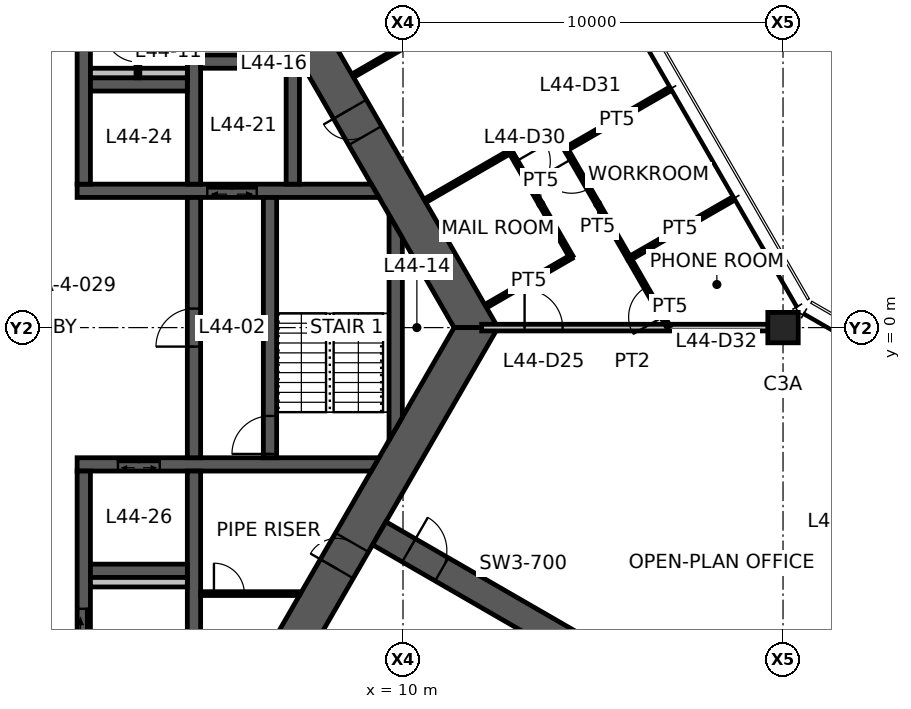
"""IFC4 building model, lengths in metres.
Left out: names, types, materials, properties, quantities, classifications, styles, units other than length and angle.
Written with IfcOpenShell. Run it as: python <this file> out.ifc"""

import sys

from ifc_helpers import new_model, si_unit, direction, frame, frame_2d, origin, origin_2d, place, context, subcontext, project, spatial, polyline, rectangle, hollow_rectangle, outline, extrude, element, fill, save


model = new_model("IFC4")
c1 = context("Model", 3, precision=1e-05, world=origin(), true_north=direction((0.0, 1.0)))
c2 = subcontext(c1, "Body", "Model", "MODEL_VIEW")
j1 = project(units=[si_unit("LENGTHUNIT", "METRE"), si_unit("PLANEANGLEUNIT", "RADIAN")], contexts=[c1])
p1 = place(None, origin())
s1 = spatial("IfcSite", under=j1, at=p1, CompositionType="ELEMENT")
p2 = place(p1, origin())
s2 = spatial("IfcBuilding", under=s1, at=p2, CompositionType="ELEMENT")
p3 = place(p2, frame((0.0, 0.0, 176.0)))
s3 = spatial("IfcBuildingStorey", under=s2, at=p3, CompositionType="ELEMENT", Elevation=176.0)
p4 = place(p3, frame((20.0, 0.0, 0.0), z_axis=(0.0, 0.0, 1.0), x_axis=(1.0, 0.0, 0.0)))
e1 = element("IfcColumn", 1, at=p4, inside=s3, PredefinedType="COLUMN", context=c2, shape_type="SweptSolid", body=[
    extrude(hollow_rectangle(XDim=0.8, YDim=0.8, WallThickness=0.045, at=origin_2d()), origin(), (0.0, 0.0, 1.0), 3.9),
])
p5 = place(p3, frame((11.922, 0.0, 0.0), z_axis=(0.0, 0.0, 1.0), x_axis=(-0.500004296715, 0.866022923061, 0.0)))
e2 = element("IfcWall", 2, at=p5, inside=s3, PredefinedType="SHEAR", context=c2, shape_type="SweptSolid", body=[
    extrude(outline(polyline([(-0.289, -0.5), (5.835, -0.5), (6.635, -0.5), (12.211, -0.5), (11.634, 0.5), (6.635, 0.5), (5.835, 0.5), (0.289, 0.5), (-0.289, -0.5)])), origin(), (0.0, 0.0, 1.0), 3.9),
])
p6 = place(p5, frame((5.835, 0.0, 0.0)))
e3 = element("IfcOpeningElement", 3, at=p6, cuts=e2, PredefinedType="OPENING", context=c2, shape_type="SweptSolid", body=[
    extrude(rectangle(XDim=0.8, YDim=2.1, at=frame_2d((0.4, 1.05))), frame((0.0, 0.51, 0.0), z_axis=(0.0, -1.0, 0.0), x_axis=(1.0, 0.0, 0.0)), (0.0, 0.0, 1.0), 1.02),
])
p7 = place(p3, frame((5.961, -10.325, 0.0), z_axis=(0.0, 0.0, 1.0), x_axis=(0.500004296715, 0.866022923061, 0.0)))
e4 = element("IfcWall", 4, at=p7, inside=s3, PredefinedType="SHEAR", context=c2, shape_type="SweptSolid", body=[
    extrude(outline(polyline([(-0.289, -0.5), (4.594, -0.5), (5.394, -0.5), (12.211, -0.5), (11.634, 0.5), (5.394, 0.5), (4.594, 0.5), (0.289, 0.5), (-0.289, -0.5)])), origin(), (0.0, 0.0, 1.0), 3.9),
])
p8 = place(p7, frame((4.594, 0.0, 0.0)))
e5 = element("IfcOpeningElement", 5, at=p8, cuts=e4, PredefinedType="OPENING", context=c2, shape_type="SweptSolid", body=[
    extrude(rectangle(XDim=0.8, YDim=2.1, at=frame_2d((0.4, 1.05))), frame((0.0, 0.51, 0.0), z_axis=(0.0, -1.0, 0.0), x_axis=(1.0, 0.0, 0.0)), (0.0, 0.0, 1.0), 1.02),
])
p9 = place(p3, frame((9.375, -5.413, 0.0), z_axis=(0.0, 0.0, 1.0), x_axis=(0.866032377459, -0.499987921047, 0.0)))
e6 = element("IfcWall", 6, at=p9, inside=s3, PredefinedType="SHEAR", context=c2, shape_type="SweptSolid", body=[
    extrude(rectangle(XDim=7.696, YDim=0.7, at=frame_2d((3.848, 0.0))), origin(), (0.0, 0.0, 1.0), 3.9),
])
p10 = place(p9, frame((0.9, 0.0, 0.0)))
e7 = element("IfcOpeningElement", 7, at=p10, cuts=e6, PredefinedType="OPENING", context=c2, shape_type="SweptSolid", body=[
    extrude(rectangle(XDim=1.0, YDim=2.1, at=frame_2d((0.5, 1.05))), frame((0.0, 0.36, 0.0), z_axis=(0.0, -1.0, 0.0), x_axis=(1.0, 0.0, 0.0)), (0.0, 0.0, 1.0), 0.72),
])
p11 = place(p3, frame((1.425, 3.6, 0.0), z_axis=(0.0, 0.0, 1.0), x_axis=(1.0, 0.0, 0.0)))
e8 = element("IfcWall", 8, at=p11, inside=s3, PredefinedType="SHEAR", context=c2, shape_type="SweptSolid", body=[
    extrude(outline(polyline([(0.0, -0.175), (3.425, -0.175), (4.725, -0.175), (7.942, -0.175), (7.74, 0.175), (4.725, 0.175), (3.425, 0.175), (0.0, 0.175), (0.0, -0.175)])), origin(), (0.0, 0.0, 1.0), 3.9),
])
p12 = place(p11, frame((3.425, 0.0, 0.0)))
e9 = element("IfcOpeningElement", 9, at=p12, cuts=e8, PredefinedType="OPENING", context=c2, shape_type="SweptSolid", body=[
    extrude(rectangle(XDim=1.3, YDim=2.1, at=frame_2d((0.65, 1.05))), frame((0.0, 0.185, 0.0), z_axis=(0.0, -1.0, 0.0), x_axis=(1.0, 0.0, 0.0)), (0.0, 0.0, 1.0), 0.37),
])
p13 = place(p3, frame((1.425, -3.6, 0.0), z_axis=(0.0, 0.0, 1.0), x_axis=(1.0, 0.0, 0.0)))
e10 = element("IfcWall", 10, at=p13, inside=s3, PredefinedType="SHEAR", context=c2, shape_type="SweptSolid", body=[
    extrude(outline(polyline([(0.0, -0.175), (1.075, -0.175), (2.175, -0.175), (7.74, -0.175), (7.942, 0.175), (2.175, 0.175), (1.075, 0.175), (0.0, 0.175), (0.0, -0.175)])), origin(), (0.0, 0.0, 1.0), 3.9),
])
p14 = place(p13, frame((1.075, 0.0, 0.0)))
e11 = element("IfcOpeningElement", 11, at=p14, cuts=e10, PredefinedType="OPENING", context=c2, shape_type="SweptSolid", body=[
    extrude(rectangle(XDim=1.1, YDim=2.1, at=frame_2d((0.55, 1.05))), frame((0.0, 0.185, 0.0), z_axis=(0.0, -1.0, 0.0), x_axis=(1.0, 0.0, 0.0)), (0.0, 0.0, 1.0), 0.37),
])
p15 = place(p3, frame((1.6, 3.775, 0.0), z_axis=(0.0, 0.0, 1.0), x_axis=(0.0, 1.0, 0.0)))
e12 = element("IfcWall", 12, at=p15, inside=s3, PredefinedType="SHEAR", context=c2, shape_type="SweptSolid", body=[
    extrude(rectangle(XDim=6.05, YDim=0.35, at=frame_2d((3.025, 0.0))), origin(), (0.0, 0.0, 1.0), 3.9),
])
p16 = place(p15, frame((3.775, 0.0, 0.0)))
e13 = element("IfcOpeningElement", 13, at=p16, cuts=e12, PredefinedType="OPENING", context=c2, shape_type="SweptSolid", body=[
    extrude(rectangle(XDim=0.9, YDim=2.1, at=frame_2d((0.45, 1.05))), frame((0.0, 0.185, 0.0), z_axis=(0.0, -1.0, 0.0), x_axis=(1.0, 0.0, 0.0)), (0.0, 0.0, 1.0), 0.37),
])
p17 = place(p3, frame((1.6, -3.775, 0.0), z_axis=(0.0, 0.0, 1.0), x_axis=(0.0, -1.0, 0.0)))
e14 = element("IfcWall", 14, at=p17, inside=s3, PredefinedType="SHEAR", context=c2, shape_type="SweptSolid", body=[
    extrude(rectangle(XDim=6.05, YDim=0.35, at=frame_2d((3.025, 0.0))), origin(), (0.0, 0.0, 1.0), 3.9),
])
p18 = place(p17, frame((3.625, 0.0, 0.0)))
e15 = element("IfcOpeningElement", 15, at=p18, cuts=e14, PredefinedType="OPENING", context=c2, shape_type="SweptSolid", body=[
    extrude(rectangle(XDim=1.2, YDim=2.1, at=frame_2d((0.6, 1.05))), frame((0.0, 0.185, 0.0), z_axis=(0.0, -1.0, 0.0), x_axis=(1.0, 0.0, 0.0)), (0.0, 0.0, 1.0), 0.37),
])
p19 = place(p3, frame((4.5, -3.425, 0.0), z_axis=(0.0, 0.0, 1.0), x_axis=(0.0, 1.0, 0.0)))
e16 = element("IfcWall", 16, at=p19, inside=s3, PredefinedType="SHEAR", context=c2, shape_type="SweptSolid", body=[
    extrude(rectangle(XDim=6.85, YDim=0.35, at=frame_2d((3.425, 0.0))), origin(), (0.0, 0.0, 1.0), 3.9),
])
p20 = place(p19, frame((2.925, 0.0, 0.0)))
e17 = element("IfcOpeningElement", 17, at=p20, cuts=e16, PredefinedType="OPENING", context=c2, shape_type="SweptSolid", body=[
    extrude(rectangle(XDim=1.0, YDim=2.1, at=frame_2d((0.5, 1.05))), frame((0.0, 0.185, 0.0), z_axis=(0.0, -1.0, 0.0), x_axis=(1.0, 0.0, 0.0)), (0.0, 0.0, 1.0), 0.37),
])
p21 = place(p3, frame((6.5, -3.425, 0.0), z_axis=(0.0, 0.0, 1.0), x_axis=(0.0, 1.0, 0.0)))
e18 = element("IfcWall", 18, at=p21, inside=s3, PredefinedType="SHEAR", context=c2, shape_type="SweptSolid", body=[
    extrude(rectangle(XDim=6.85, YDim=0.35, at=frame_2d((3.425, 0.0))), origin(), (0.0, 0.0, 1.0), 3.9),
])
p22 = place(p21, frame((0.1, 0.0, 0.0)))
e19 = element("IfcOpeningElement", 19, at=p22, cuts=e18, PredefinedType="OPENING", context=c2, shape_type="SweptSolid", body=[
    extrude(rectangle(XDim=1.0, YDim=2.1, at=frame_2d((0.5, 1.05))), frame((0.0, 0.185, 0.0), z_axis=(0.0, -1.0, 0.0), x_axis=(1.0, 0.0, 0.0)), (0.0, 0.0, 1.0), 0.37),
])
p23 = place(p3, frame((4.5, 3.775, 0.0), z_axis=(0.0, 0.0, 1.0), x_axis=(0.0, 1.0, 0.0)))
e20 = element("IfcWall", 20, at=p23, inside=s3, PredefinedType="SHEAR", context=c2, shape_type="SweptSolid", body=[
    extrude(rectangle(XDim=3.4, YDim=0.35, at=frame_2d((1.7, 0.0))), origin(), (0.0, 0.0, 1.0), 3.9),
])
p24 = place(p3, frame((4.5, -3.775, 0.0), z_axis=(0.0, 0.0, 1.0), x_axis=(0.0, -1.0, 0.0)))
e21 = element("IfcWall", 21, at=p24, inside=s3, PredefinedType="SHEAR", context=c2, shape_type="SweptSolid", body=[
    extrude(rectangle(XDim=6.05, YDim=0.35, at=frame_2d((3.025, 0.0))), origin(), (0.0, 0.0, 1.0), 3.9),
])
for number, where, z_axis, x_axis in (
    (22, (1.775, 6.4, 0.0), (0.0, 0.0, 1.0), (1.0, 0.0, 0.0)),
    (23, (1.775, -6.4, 0.0), (0.0, 0.0, 1.0), (1.0, 0.0, 0.0)),
):
    element("IfcWall", number, at=place(p3, frame(where, z_axis=z_axis, x_axis=x_axis)), inside=s3, PredefinedType="SHEAR", context=c2, shape_type="SweptSolid", body=[
        extrude(rectangle(XDim=2.55, YDim=0.35, at=frame_2d((1.275, 0.0))), origin(), (0.0, 0.0, 1.0), 3.9),
    ])
p25 = place(p3, frame((4.675, 7.0, 0.0), z_axis=(0.0, 0.0, 1.0), x_axis=(1.0, 0.0, 0.0)))
e24 = element("IfcWall", 24, at=p25, inside=s3, PredefinedType="SHEAR", context=c2, shape_type="SweptSolid", body=[
    extrude(rectangle(XDim=2.25, YDim=0.35, at=frame_2d((1.125, 0.0))), origin(), (0.0, 0.0, 1.0), 3.9),
])
p26 = place(p3, frame((7.1, 3.775, 0.0), z_axis=(0.0, 0.0, 1.0), x_axis=(0.0, 1.0, 0.0)))
e25 = element("IfcWall", 25, at=p26, inside=s3, PredefinedType="SHEAR", context=c2, shape_type="SweptSolid", body=[
    extrude(outline(polyline([(0.0, -0.175), (3.274, -0.175), (3.4, 0.0), (3.4, 0.175), (0.0, 0.175), (0.0, -0.175)])), origin(), (0.0, 0.0, 1.0), 3.9),
])
p27 = place(p3, frame((9.808, -2.662, 0.0), z_axis=(0.0, 0.0, 1.0), x_axis=(0.0, 1.0, 0.0)))
e26 = element("IfcWall", 26, at=p27, inside=s3, PredefinedType="SHEAR", context=c2, shape_type="SweptSolid", body=[
    extrude(outline(polyline([(0.303, -0.175), (5.021, -0.175), (5.628, 0.175), (-0.303, 0.175), (0.303, -0.175)])), origin(), (0.0, 0.0, 1.0), 3.9),
])
p28 = place(p3, frame((4.5, 7.175, 0.0), z_axis=(0.0, 0.0, 1.0), x_axis=(0.0, 1.0, 0.0)))
e27 = element("IfcWall", 27, at=p28, inside=s3, PredefinedType="STANDARD", context=c2, shape_type="SweptSolid", body=[
    extrude(rectangle(XDim=2.65, YDim=0.2, at=frame_2d((1.325, 0.0))), origin(), (0.0, 0.0, 1.0), 3.9),
])
for number, where, z_axis, x_axis in (
    (28, (1.775, 6.7, 0.0), (0.0, 0.0, 1.0), (1.0, 0.0, 0.0)),
    (29, (1.775, -6.7, 0.0), (0.0, 0.0, 1.0), (1.0, 0.0, 0.0)),
):
    element("IfcWall", number, at=place(p3, frame(where, z_axis=z_axis, x_axis=x_axis)), inside=s3, PredefinedType="PLUMBINGWALL", context=c2, shape_type="SweptSolid", body=[
        extrude(rectangle(XDim=2.55, YDim=0.25, at=frame_2d((1.275, 0.0))), origin(), (0.0, 0.0, 1.0), 3.9),
    ])
p29 = place(p3, frame((3.025, 6.575, 0.0), z_axis=(0.0, 0.0, 1.0), x_axis=(0.0, 1.0, 0.0)))
e30 = element("IfcWall", 30, at=p29, inside=s3, PredefinedType="PARTITIONING", context=c2, shape_type="SweptSolid", body=[
    extrude(rectangle(XDim=3.25, YDim=0.1, at=frame_2d((1.625, 0.0))), origin(), (0.0, 0.0, 1.0), 2.95),
])
p30 = place(p29, frame((1.962, 0.0, 0.0)))
e31 = element("IfcOpeningElement", 31, at=p30, cuts=e30, PredefinedType="OPENING", context=c2, shape_type="SweptSolid", body=[
    extrude(rectangle(XDim=0.9, YDim=2.1, at=frame_2d((0.45, 1.05))), frame((0.0, 0.06, 0.0), z_axis=(0.0, -1.0, 0.0), x_axis=(1.0, 0.0, 0.0)), (0.0, 0.0, 1.0), 0.12),
])
p31 = place(p29, frame((0.413, 0.0, 0.0)))
e32 = element("IfcOpeningElement", 32, at=p31, cuts=e30, PredefinedType="OPENING", context=c2, shape_type="SweptSolid", body=[
    extrude(rectangle(XDim=0.9, YDim=2.1, at=frame_2d((0.45, 1.05))), frame((0.0, 0.06, 0.0), z_axis=(0.0, -1.0, 0.0), x_axis=(1.0, 0.0, 0.0)), (0.0, 0.0, 1.0), 0.12),
])
p32 = place(p3, frame((4.675, -7.0, 0.0), z_axis=(0.0, 0.0, 1.0), x_axis=(1.0, 0.0, 0.0)))
e33 = element("IfcWall", 33, at=p32, inside=s3, PredefinedType="PARTITIONING", context=c2, shape_type="SweptSolid", body=[
    extrude(outline(polyline([(0.0, -0.05), (0.35, -0.05), (1.15, -0.05), (2.6, -0.05), (2.628, 0.0), (2.634, 0.05), (1.15, 0.05), (0.35, 0.05), (0.0, 0.05), (0.0, -0.05)])), origin(), (0.0, 0.0, 1.0), 2.95),
])
p33 = place(p32, frame((0.35, 0.0, 0.0)))
e34 = element("IfcOpeningElement", 34, at=p33, cuts=e33, PredefinedType="OPENING", context=c2, shape_type="SweptSolid", body=[
    extrude(rectangle(XDim=0.8, YDim=2.1, at=frame_2d((0.4, 1.05))), frame((0.0, 0.06, 0.0), z_axis=(0.0, -1.0, 0.0), x_axis=(1.0, 0.0, 0.0)), (0.0, 0.0, 1.0), 0.12),
])
p34 = place(p3, frame((12.07, 0.0, 0.0), z_axis=(0.0, 0.0, 1.0), x_axis=(1.0, 0.0, 0.0)))
e35 = element("IfcWall", 35, at=p34, inside=s3, PredefinedType="PARTITIONING", context=c2, shape_type="SweptSolid", body=[
    extrude(rectangle(XDim=7.93, YDim=0.175, at=frame_2d((3.965, 0.0))), origin(), (0.0, 0.0, 1.0), 3.05),
])
p35 = place(p34, frame((1.13, 0.0, 0.0)))
e36 = element("IfcOpeningElement", 36, at=p35, cuts=e35, PredefinedType="OPENING", context=c2, shape_type="SweptSolid", body=[
    extrude(rectangle(XDim=1.0, YDim=2.1, at=frame_2d((0.5, 1.05))), frame((0.0, 0.098, 0.0), z_axis=(0.0, -1.0, 0.0), x_axis=(1.0, 0.0, 0.0)), (0.0, 0.0, 1.0), 0.195),
])
p36 = place(p3, frame((11.1, 8.025, 0.0), z_axis=(0.0, 0.0, 1.0), x_axis=(-0.866056901187, -0.49994544093, 0.0)))
e37 = element("IfcWall", 37, at=p36, inside=s3, PredefinedType="PARTITIONING", context=c2, shape_type="SweptSolid", body=[
    extrude(rectangle(XDim=2.78, YDim=0.1, at=frame_2d((1.39, 0.0))), origin(), (0.0, 0.0, 1.0), 2.95),
])
p37 = place(p3, frame((10.592, 3.344, 0.0), z_axis=(0.0, 0.0, 1.0), x_axis=(0.866021702275, 0.500006411147, 0.0)))
e38 = element("IfcWall", 38, at=p37, inside=s3, PredefinedType="PARTITIONING", context=c2, shape_type="SweptSolid", body=[
    extrude(rectangle(XDim=2.58, YDim=0.1, at=frame_2d((1.29, 0.0))), origin(), (0.0, 0.0, 1.0), 2.95),
])
p38 = place(p3, frame((12.826, 4.634, 0.0), z_axis=(0.0, 0.0, 1.0), x_axis=(0.500028443584, -0.866008981251, 0.0)))
e39 = element("IfcWall", 39, at=p38, inside=s3, PredefinedType="PARTITIONING", context=c2, shape_type="SweptSolid", body=[
    extrude(rectangle(XDim=3.2, YDim=0.1, at=frame_2d((1.6, 0.0))), origin(), (0.0, 0.0, 1.0), 2.95),
])
p39 = place(p38, frame((0.3, 0.0, 0.0)))
e40 = element("IfcOpeningElement", 40, at=p39, cuts=e39, PredefinedType="OPENING", context=c2, shape_type="SweptSolid", body=[
    extrude(rectangle(XDim=0.9, YDim=2.1, at=frame_2d((0.45, 1.05))), frame((0.0, 0.06, 0.0), z_axis=(0.0, -1.0, 0.0), x_axis=(1.0, 0.0, 0.0)), (0.0, 0.0, 1.0), 0.12),
])
p40 = place(p3, frame((14.427, 1.863, 0.0), z_axis=(0.0, 0.0, 1.0), x_axis=(-0.866045356598, -0.49996543912, 0.0)))
e41 = element("IfcWall", 41, at=p40, inside=s3, PredefinedType="PARTITIONING", context=c2, shape_type="SweptSolid", body=[
    extrude(rectangle(XDim=2.58, YDim=0.1, at=frame_2d((1.29, 0.0))), origin(), (0.0, 0.0, 1.0), 2.95),
])
p41 = place(p3, frame((18.62, 3.351, 0.0), z_axis=(0.0, 0.0, 1.0), x_axis=(-0.866810383216, -0.498637904244, 0.0)))
e42 = element("IfcWall", 42, at=p41, inside=s3, PredefinedType="PARTITIONING", context=c2, shape_type="SweptSolid", body=[
    extrude(rectangle(XDim=3.08, YDim=0.1, at=frame_2d((1.54, 0.0))), origin(), (0.0, 0.0, 1.0), 2.95),
])
p42 = place(p3, frame((14.287, 4.695, 0.0), z_axis=(0.0, 0.0, 1.0), x_axis=(0.866023220135, 0.500003782172, 0.0)))
e43 = element("IfcWall", 43, at=p42, inside=s3, PredefinedType="PARTITIONING", context=c2, shape_type="SweptSolid", body=[
    extrude(rectangle(XDim=3.105, YDim=0.1, at=frame_2d((1.552, 0.0))), origin(), (0.0, 0.0, 1.0), 2.95),
])
p43 = place(p3, frame((15.956, 1.813, 0.0), z_axis=(0.0, 0.0, 1.0), x_axis=(-0.501111387448, 0.865382792393, 0.0)))
e44 = element("IfcWall", 44, at=p43, inside=s3, PredefinedType="PARTITIONING", context=c2, shape_type="SweptSolid", body=[
    extrude(rectangle(XDim=3.331, YDim=0.1, at=frame_2d((1.666, 0.0))), origin(), (0.0, 0.0, 1.0), 2.95),
])
p44 = place(p43, frame((2.131, 0.0, 0.0)))
e45 = element("IfcOpeningElement", 45, at=p44, cuts=e44, PredefinedType="OPENING", context=c2, shape_type="SweptSolid", body=[
    extrude(rectangle(XDim=0.9, YDim=2.1, at=frame_2d((0.45, 1.05))), frame((0.0, 0.06, 0.0), z_axis=(0.0, -1.0, 0.0), x_axis=(1.0, 0.0, 0.0)), (0.0, 0.0, 1.0), 0.12),
])
p45 = place(p3, frame((16.986, 0.02, 0.0), z_axis=(0.0, 0.0, 1.0), x_axis=(-0.498096123952, 0.867121820337, 0.0)))
e46 = element("IfcWall", 46, at=p45, inside=s3, PredefinedType="PARTITIONING", context=c2, shape_type="SweptSolid", body=[
    extrude(rectangle(XDim=2.067, YDim=0.1, at=frame_2d((1.034, 0.0))), origin(), (0.0, 0.0, 1.0), 2.95),
])
p46 = place(p45, frame((0.3, 0.0, 0.0)))
e47 = element("IfcOpeningElement", 47, at=p46, cuts=e46, PredefinedType="OPENING", context=c2, shape_type="SweptSolid", body=[
    extrude(rectangle(XDim=0.9, YDim=2.1, at=frame_2d((0.45, 1.05))), frame((0.0, 0.06, 0.0), z_axis=(0.0, -1.0, 0.0), x_axis=(1.0, 0.0, 0.0)), (0.0, 0.0, 1.0), 0.12),
])
p47 = place(p6, origin())
e48 = element("IfcDoor", 48, at=p47, inside=s3, OperationType="SINGLE_SWING_RIGHT", PredefinedType="DOOR", context=c2, shape_type="SweptSolid", body=[
    extrude(rectangle(XDim=0.8, YDim=2.1, at=frame_2d((0.4, 1.05))), frame((0.0, 0.025, 0.0), z_axis=(0.0, -1.0, 0.0), x_axis=(1.0, 0.0, 0.0)), (0.0, 0.0, 1.0), 0.05),
])
fill(e3, e48)
p48 = place(p8, origin())
e49 = element("IfcDoor", 49, at=p48, inside=s3, OperationType="SINGLE_SWING_LEFT", PredefinedType="DOOR", context=c2, shape_type="SweptSolid", body=[
    extrude(rectangle(XDim=0.8, YDim=2.1, at=frame_2d((0.4, 1.05))), frame((0.0, 0.025, 0.0), z_axis=(0.0, -1.0, 0.0), x_axis=(1.0, 0.0, 0.0)), (0.0, 0.0, 1.0), 0.05),
])
fill(e5, e49)
p49 = place(p20, origin())
e50 = element("IfcDoor", 50, at=p49, inside=s3, OperationType="SINGLE_SWING_LEFT", PredefinedType="DOOR", context=c2, shape_type="SweptSolid", body=[
    extrude(rectangle(XDim=1.0, YDim=2.1, at=frame_2d((0.5, 1.05))), frame((0.0, 0.025, 0.0), z_axis=(0.0, -1.0, 0.0), x_axis=(1.0, 0.0, 0.0)), (0.0, 0.0, 1.0), 0.05),
])
fill(e17, e50)
p50 = place(p22, origin())
e51 = element("IfcDoor", 51, at=p50, inside=s3, OperationType="SINGLE_SWING_LEFT", PredefinedType="DOOR", context=c2, shape_type="SweptSolid", body=[
    extrude(rectangle(XDim=1.0, YDim=2.1, at=frame_2d((0.5, 1.05))), frame((0.0, 0.025, 0.0), z_axis=(0.0, -1.0, 0.0), x_axis=(1.0, 0.0, 0.0)), (0.0, 0.0, 1.0), 0.05),
])
fill(e19, e51)
p51 = place(p18, origin())
e52 = element("IfcDoor", 52, at=p51, inside=s3, OperationType="SLIDING_TO_LEFT", PredefinedType="DOOR", context=c2, shape_type="SweptSolid", body=[
    extrude(rectangle(XDim=1.2, YDim=2.1, at=frame_2d((0.6, 1.05))), frame((0.0, 0.025, 0.0), z_axis=(0.0, -1.0, 0.0), x_axis=(1.0, 0.0, 0.0)), (0.0, 0.0, 1.0), 0.05),
])
fill(e15, e52)
p52 = place(p10, origin())
e53 = element("IfcDoor", 53, at=p52, inside=s3, OperationType="SINGLE_SWING_LEFT", PredefinedType="DOOR", context=c2, shape_type="SweptSolid", body=[
    extrude(rectangle(XDim=1.0, YDim=2.1, at=frame_2d((0.5, 1.05))), frame((0.0, 0.025, 0.0), z_axis=(0.0, -1.0, 0.0), x_axis=(1.0, 0.0, 0.0)), (0.0, 0.0, 1.0), 0.05),
])
fill(e7, e53)
p53 = place(p31, origin())
e54 = element("IfcDoor", 54, at=p53, inside=s3, OperationType="SINGLE_SWING_RIGHT", PredefinedType="DOOR", context=c2, shape_type="SweptSolid", body=[
    extrude(rectangle(XDim=0.9, YDim=2.1, at=frame_2d((0.45, 1.05))), frame((0.0, 0.025, 0.0), z_axis=(0.0, -1.0, 0.0), x_axis=(1.0, 0.0, 0.0)), (0.0, 0.0, 1.0), 0.05),
])
fill(e32, e54)
p54 = place(p33, origin())
e55 = element("IfcDoor", 55, at=p54, inside=s3, OperationType="SINGLE_SWING_LEFT", PredefinedType="DOOR", context=c2, shape_type="SweptSolid", body=[
    extrude(rectangle(XDim=0.8, YDim=2.1, at=frame_2d((0.4, 1.05))), frame((0.0, 0.025, 0.0), z_axis=(0.0, -1.0, 0.0), x_axis=(1.0, 0.0, 0.0)), (0.0, 0.0, 1.0), 0.05),
])
fill(e34, e55)
p55 = place(p35, origin())
e56 = element("IfcDoor", 56, at=p55, inside=s3, OperationType="SINGLE_SWING_LEFT", PredefinedType="DOOR", context=c2, shape_type="SweptSolid", body=[
    extrude(rectangle(XDim=1.0, YDim=2.1, at=frame_2d((0.5, 1.05))), frame((0.0, 0.025, 0.0), z_axis=(0.0, -1.0, 0.0), x_axis=(1.0, 0.0, 0.0)), (0.0, 0.0, 1.0), 0.05),
])
fill(e36, e56)
p56 = place(p39, origin())
e57 = element("IfcDoor", 57, at=p56, inside=s3, OperationType="SINGLE_SWING_LEFT", PredefinedType="DOOR", context=c2, shape_type="SweptSolid", body=[
    extrude(rectangle(XDim=0.9, YDim=2.1, at=frame_2d((0.45, 1.05))), frame((0.0, 0.025, 0.0), z_axis=(0.0, -1.0, 0.0), x_axis=(1.0, 0.0, 0.0)), (0.0, 0.0, 1.0), 0.05),
])
fill(e40, e57)
p57 = place(p44, origin())
e58 = element("IfcDoor", 58, at=p57, inside=s3, OperationType="SINGLE_SWING_RIGHT", PredefinedType="DOOR", context=c2, shape_type="SweptSolid", body=[
    extrude(rectangle(XDim=0.9, YDim=2.1, at=frame_2d((0.45, 1.05))), frame((0.0, 0.025, 0.0), z_axis=(0.0, -1.0, 0.0), x_axis=(1.0, 0.0, 0.0)), (0.0, 0.0, 1.0), 0.05),
])
fill(e45, e58)
p58 = place(p46, origin())
e59 = element("IfcDoor", 59, at=p58, inside=s3, OperationType="SINGLE_SWING_LEFT", PredefinedType="DOOR", context=c2, shape_type="SweptSolid", body=[
    extrude(rectangle(XDim=0.9, YDim=2.1, at=frame_2d((0.45, 1.05))), frame((0.0, 0.025, 0.0), z_axis=(0.0, -1.0, 0.0), x_axis=(1.0, 0.0, 0.0)), (0.0, 0.0, 1.0), 0.05),
])
fill(e47, e59)
p59 = place(p14, origin())
e60 = element("IfcDoor", 60, at=p59, inside=s3, OperationType="DOUBLE_DOOR_SLIDING", PredefinedType="DOOR", context=c2, shape_type="SweptSolid", body=[
    extrude(rectangle(XDim=1.1, YDim=2.1, at=frame_2d((0.55, 1.05))), frame((0.0, 0.025, 0.0), z_axis=(0.0, -1.0, 0.0), x_axis=(1.0, 0.0, 0.0)), (0.0, 0.0, 1.0), 0.05),
])
fill(e11, e60)
p60 = place(p12, origin())
e61 = element("IfcDoor", 61, at=p60, inside=s3, OperationType="DOUBLE_DOOR_SLIDING", PredefinedType="DOOR", context=c2, shape_type="SweptSolid", body=[
    extrude(rectangle(XDim=1.3, YDim=2.1, at=frame_2d((0.65, 1.05))), frame((0.0, 0.025, 0.0), z_axis=(0.0, -1.0, 0.0), x_axis=(1.0, 0.0, 0.0)), (0.0, 0.0, 1.0), 0.05),
])
fill(e9, e61)
save(model, sys.argv[1])
